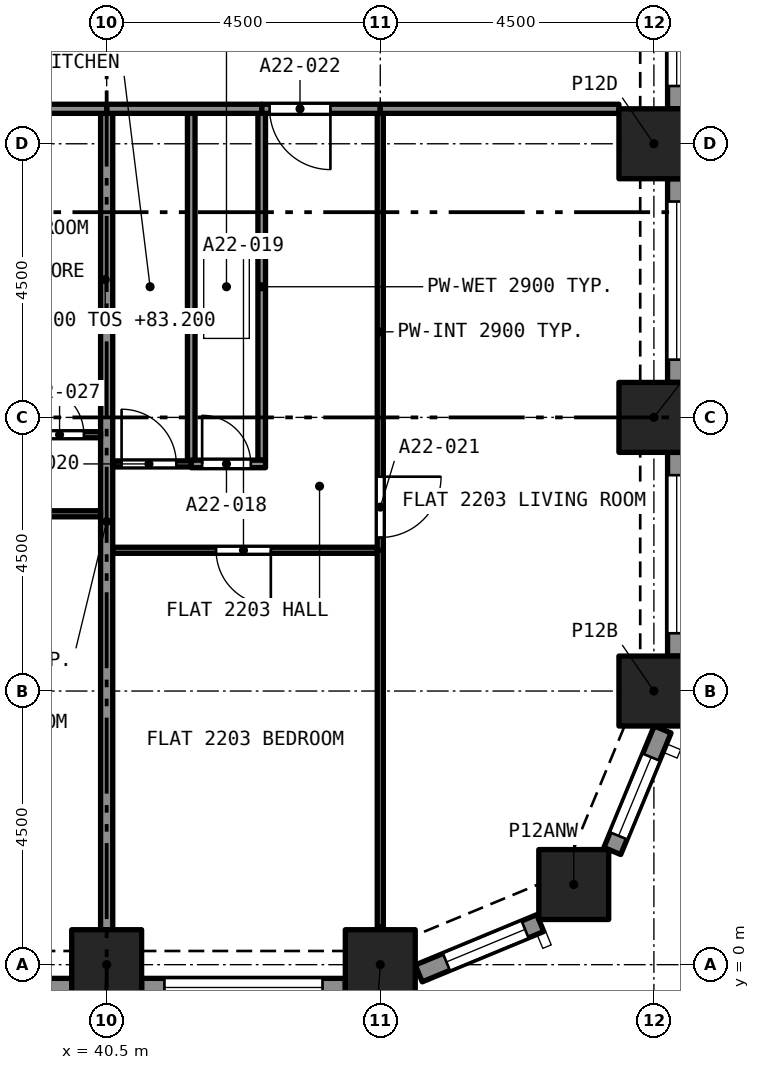
"""IFC4 building model, lengths in metres.
Left out: names, types, materials, properties, quantities, classifications, styles, units other than length and angle.
Written with IfcOpenShell. Run it as: python <this file> out.ifc"""

import sys

from ifc_helpers import new_model, si_unit, direction, frame, frame_2d, origin, origin_2d, place, context, subcontext, project, spatial, rectangle, extrude, element, fill, save


model = new_model("IFC4")
c1 = context("Model", 3, precision=1e-05, world=origin(), true_north=direction((0.0, 1.0)))
c2 = subcontext(c1, "Body", "Model", "MODEL_VIEW")
j1 = project(units=[si_unit("LENGTHUNIT", "METRE"), si_unit("PLANEANGLEUNIT", "RADIAN")], contexts=[c1])
p1 = place(None, origin())
s1 = spatial("IfcSite", under=j1, at=p1, CompositionType="ELEMENT")
p2 = place(p1, origin())
s2 = spatial("IfcBuilding", under=s1, at=p2, CompositionType="ELEMENT")
p3 = place(p2, frame((0.0, 0.0, 83.2)))
s3 = spatial("IfcBuildingStorey", under=s2, at=p3, CompositionType="ELEMENT", Elevation=83.2)
for number, where, z_axis, x_axis in (
    (1, (40.5, 0.0, 0.0), (0.0, 0.0, 1.0), (1.0, 0.0, 0.0)),
    (2, (45.0, 0.0, 0.0), (0.0, 0.0, 1.0), (1.0, 0.0, 0.0)),
    (3, (48.182, 1.318, 0.0), (0.0, 0.0, 1.0), (1.0, 0.0, 0.0)),
    (4, (49.5, 4.5, 0.0), (0.0, 0.0, 1.0), (1.0, 0.0, 0.0)),
    (5, (49.5, 9.0, 0.0), (0.0, 0.0, 1.0), (1.0, 0.0, 0.0)),
    (6, (49.5, 13.5, 0.0), (0.0, 0.0, 1.0), (1.0, 0.0, 0.0)),
):
    element("IfcColumn", number, at=place(p3, frame(where, z_axis=z_axis, x_axis=x_axis)), inside=s3, PredefinedType="COLUMN", context=c2, shape_type="SweptSolid", body=[
        extrude(rectangle(XDim=1.15, YDim=1.15, at=origin_2d()), origin(), (0.0, 0.0, 1.0), 3.2),
    ])
p4 = place(p3, frame((39.925, -0.375, 0.0), z_axis=(0.0, 0.0, 1.0), x_axis=(-1.0, 0.0, 0.0)))
e7 = element("IfcWall", 7, at=p4, inside=s3, PredefinedType="SOLIDWALL", context=c2, shape_type="SweptSolid", body=[
    extrude(rectangle(XDim=3.35, YDim=0.3, at=frame_2d((1.675, 0.0))), origin(), (0.0, 0.0, 1.0), 3.2),
])
p5 = place(p4, frame((0.375, 0.0, 0.45)))
e8 = element("IfcOpeningElement", 8, at=p5, cuts=e7, PredefinedType="OPENING", context=c2, shape_type="SweptSolid", body=[
    extrude(rectangle(XDim=2.6, YDim=1.95, at=frame_2d((1.3, 0.975))), frame((0.0, 0.16, 0.0), z_axis=(0.0, -1.0, 0.0), x_axis=(1.0, 0.0, 0.0)), (0.0, 0.0, 1.0), 0.32),
])
p6 = place(p3, frame((44.425, -0.375, 0.0), z_axis=(0.0, 0.0, 1.0), x_axis=(-1.0, 0.0, 0.0)))
e9 = element("IfcWall", 9, at=p6, inside=s3, PredefinedType="SOLIDWALL", context=c2, shape_type="SweptSolid", body=[
    extrude(rectangle(XDim=3.35, YDim=0.3, at=frame_2d((1.675, 0.0))), origin(), (0.0, 0.0, 1.0), 3.2),
])
p7 = place(p6, frame((0.375, 0.0, 0.45)))
e10 = element("IfcOpeningElement", 10, at=p7, cuts=e9, PredefinedType="OPENING", context=c2, shape_type="SweptSolid", body=[
    extrude(rectangle(XDim=2.6, YDim=1.95, at=frame_2d((1.3, 0.975))), frame((0.0, 0.16, 0.0), z_axis=(0.0, -1.0, 0.0), x_axis=(1.0, 0.0, 0.0)), (0.0, 0.0, 1.0), 0.32),
])
p8 = place(p3, frame((47.631, 0.684, 0.0), z_axis=(0.0, 0.0, 1.0), x_axis=(-0.923862802911, -0.382723818695, 0.0)))
e11 = element("IfcWall", 11, at=p8, inside=s3, PredefinedType="SOLIDWALL", context=c2, shape_type="SweptSolid", body=[
    extrude(rectangle(XDim=2.164, YDim=0.3, at=frame_2d((1.082, 0.0))), origin(), (0.0, 0.0, 1.0), 3.2),
])
p9 = place(p8, frame((0.271, 0.0, 0.45)))
e12 = element("IfcOpeningElement", 12, at=p9, cuts=e11, PredefinedType="OPENING", context=c2, shape_type="SweptSolid", body=[
    extrude(rectangle(XDim=1.4, YDim=1.95, at=frame_2d((0.7, 0.975))), frame((0.0, 0.16, 0.0), z_axis=(0.0, -1.0, 0.0), x_axis=(1.0, 0.0, 0.0)), (0.0, 0.0, 1.0), 0.32),
])
p10 = place(p3, frame((49.644, 3.868, 0.0), z_axis=(0.0, 0.0, 1.0), x_axis=(-0.382723818695, -0.923862802911, 0.0)))
e13 = element("IfcWall", 13, at=p10, inside=s3, PredefinedType="SOLIDWALL", context=c2, shape_type="SweptSolid", body=[
    extrude(rectangle(XDim=2.164, YDim=0.3, at=frame_2d((1.082, 0.0))), origin(), (0.0, 0.0, 1.0), 3.2),
])
p11 = place(p10, frame((0.493, 0.0, 0.45)))
e14 = element("IfcOpeningElement", 14, at=p11, cuts=e13, PredefinedType="OPENING", context=c2, shape_type="SweptSolid", body=[
    extrude(rectangle(XDim=1.4, YDim=1.95, at=frame_2d((0.7, 0.975))), frame((0.0, 0.16, 0.0), z_axis=(0.0, -1.0, 0.0), x_axis=(1.0, 0.0, 0.0)), (0.0, 0.0, 1.0), 0.32),
])
p12 = place(p3, frame((49.875, 8.425, 0.0), z_axis=(0.0, 0.0, 1.0), x_axis=(0.0, -1.0, 0.0)))
e15 = element("IfcWall", 15, at=p12, inside=s3, PredefinedType="SOLIDWALL", context=c2, shape_type="SweptSolid", body=[
    extrude(rectangle(XDim=3.35, YDim=0.3, at=frame_2d((1.675, 0.0))), origin(), (0.0, 0.0, 1.0), 3.2),
])
p13 = place(p12, frame((0.375, 0.0, 0.45)))
e16 = element("IfcOpeningElement", 16, at=p13, cuts=e15, PredefinedType="OPENING", context=c2, shape_type="SweptSolid", body=[
    extrude(rectangle(XDim=2.6, YDim=1.95, at=frame_2d((1.3, 0.975))), frame((0.0, 0.16, 0.0), z_axis=(0.0, -1.0, 0.0), x_axis=(1.0, 0.0, 0.0)), (0.0, 0.0, 1.0), 0.32),
])
p14 = place(p3, frame((49.875, 12.925, 0.0), z_axis=(0.0, 0.0, 1.0), x_axis=(0.0, -1.0, 0.0)))
e17 = element("IfcWall", 17, at=p14, inside=s3, PredefinedType="SOLIDWALL", context=c2, shape_type="SweptSolid", body=[
    extrude(rectangle(XDim=3.35, YDim=0.3, at=frame_2d((1.675, 0.0))), origin(), (0.0, 0.0, 1.0), 3.2),
])
p15 = place(p14, frame((0.375, 0.0, 0.45)))
e18 = element("IfcOpeningElement", 18, at=p15, cuts=e17, PredefinedType="OPENING", context=c2, shape_type="SweptSolid", body=[
    extrude(rectangle(XDim=2.6, YDim=1.95, at=frame_2d((1.3, 0.975))), frame((0.0, 0.16, 0.0), z_axis=(0.0, -1.0, 0.0), x_axis=(1.0, 0.0, 0.0)), (0.0, 0.0, 1.0), 0.32),
])
p16 = place(p3, frame((49.875, 17.425, 0.0), z_axis=(0.0, 0.0, 1.0), x_axis=(0.0, -1.0, 0.0)))
e19 = element("IfcWall", 19, at=p16, inside=s3, PredefinedType="SOLIDWALL", context=c2, shape_type="SweptSolid", body=[
    extrude(rectangle(XDim=3.35, YDim=0.3, at=frame_2d((1.675, 0.0))), origin(), (0.0, 0.0, 1.0), 3.2),
])
p17 = place(p16, frame((0.375, 0.0, 0.45)))
e20 = element("IfcOpeningElement", 20, at=p17, cuts=e19, PredefinedType="OPENING", context=c2, shape_type="SweptSolid", body=[
    extrude(rectangle(XDim=2.6, YDim=1.95, at=frame_2d((1.3, 0.975))), frame((0.0, 0.16, 0.0), z_axis=(0.0, -1.0, 0.0), x_axis=(1.0, 0.0, 0.0)), (0.0, 0.0, 1.0), 0.32),
])
p18 = place(p3, frame((43.05, 8.298, 0.0), z_axis=(0.0, 0.0, 1.0), x_axis=(0.0, 1.0, 0.0)))
e21 = element("IfcWall", 21, at=p18, inside=s3, PredefinedType="PARTITIONING", context=c2, shape_type="SweptSolid", body=[
    extrude(rectangle(XDim=5.702, YDim=0.125, at=frame_2d((2.851, 0.0))), origin(), (0.0, 0.0, 1.0), 2.9),
])
p19 = place(p3, frame((41.891, 8.235, 0.0), z_axis=(0.0, 0.0, 1.0), x_axis=(1.0, 0.0, 0.0)))
e22 = element("IfcWall", 22, at=p19, inside=s3, PredefinedType="PARTITIONING", context=c2, shape_type="SweptSolid", body=[
    extrude(rectangle(XDim=1.222, YDim=0.125, at=frame_2d((0.611, 0.0))), origin(), (0.0, 0.0, 1.0), 2.9),
])
p20 = place(p19, frame((0.179, 0.0, 0.0)))
e23 = element("IfcOpeningElement", 23, at=p20, cuts=e22, PredefinedType="OPENING", context=c2, shape_type="SweptSolid", body=[
    extrude(rectangle(XDim=0.8, YDim=2.1, at=frame_2d((0.4, 1.05))), frame((0.0, 0.073, 0.0), z_axis=(0.0, -1.0, 0.0), x_axis=(1.0, 0.0, 0.0)), (0.0, 0.0, 1.0), 0.145),
])
p21 = place(p3, frame((41.891, 8.298, 0.0), z_axis=(0.0, 0.0, 1.0), x_axis=(0.0, 1.0, 0.0)))
e24 = element("IfcWall", 24, at=p21, inside=s3, PredefinedType="PARTITIONING", context=c2, shape_type="SweptSolid", body=[
    extrude(rectangle(XDim=5.702, YDim=0.125, at=frame_2d((2.851, 0.0))), origin(), (0.0, 0.0, 1.0), 2.9),
])
p22 = place(p3, frame((44.95, 6.815, 0.0), z_axis=(0.0, 0.0, 1.0), x_axis=(-1.0, 0.0, 0.0)))
e25 = element("IfcWall", 25, at=p22, inside=s3, PredefinedType="PARTITIONING", context=c2, shape_type="SweptSolid", body=[
    extrude(rectangle(XDim=4.35, YDim=0.1, at=frame_2d((2.175, 0.0))), origin(), (0.0, 0.0, 1.0), 2.9),
])
p23 = place(p22, frame((1.75, 0.0, 0.0)))
e26 = element("IfcOpeningElement", 26, at=p23, cuts=e25, PredefinedType="OPENING", context=c2, shape_type="SweptSolid", body=[
    extrude(rectangle(XDim=0.9, YDim=2.1, at=frame_2d((0.45, 1.05))), frame((0.0, 0.06, 0.0), z_axis=(0.0, -1.0, 0.0), x_axis=(1.0, 0.0, 0.0)), (0.0, 0.0, 1.0), 0.12),
])
p24 = place(p3, frame((45.0, 0.622, 0.0), z_axis=(0.0, 0.0, 1.0), x_axis=(0.0, 1.0, 0.0)))
e27 = element("IfcWall", 27, at=p24, inside=s3, PredefinedType="PARTITIONING", context=c2, shape_type="SweptSolid", body=[
    extrude(rectangle(XDim=6.193, YDim=0.1, at=frame_2d((3.096, 0.0))), origin(), (0.0, 0.0, 1.0), 2.9),
])
p25 = place(p3, frame((40.5, 0.575, 0.0), z_axis=(0.0, 0.0, 1.0), x_axis=(0.0, 1.0, 0.0)))
e28 = element("IfcWall", 28, at=p25, inside=s3, PredefinedType="PARTITIONING", context=c2, shape_type="SweptSolid", body=[
    extrude(rectangle(XDim=13.425, YDim=0.2, at=frame_2d((6.712, 0.0))), origin(), (0.0, 0.0, 1.0), 2.9),
])
p26 = place(p3, frame((40.6, 8.235, 0.0), z_axis=(0.0, 0.0, 1.0), x_axis=(1.0, 0.0, 0.0)))
e29 = element("IfcWall", 29, at=p26, inside=s3, PredefinedType="PARTITIONING", context=c2, shape_type="SweptSolid", body=[
    extrude(rectangle(XDim=1.291, YDim=0.1, at=frame_2d((0.646, 0.0))), origin(), (0.0, 0.0, 1.0), 2.9),
])
p27 = place(p26, frame((0.146, 0.0, 0.0)))
e30 = element("IfcOpeningElement", 30, at=p27, cuts=e29, PredefinedType="OPENING", context=c2, shape_type="SweptSolid", body=[
    extrude(rectangle(XDim=0.9, YDim=2.1, at=frame_2d((0.45, 1.05))), frame((0.0, 0.06, 0.0), z_axis=(0.0, -1.0, 0.0), x_axis=(1.0, 0.0, 0.0)), (0.0, 0.0, 1.0), 0.12),
])
p28 = place(p3, frame((45.0, 14.0, 0.0), z_axis=(0.0, 0.0, 1.0), x_axis=(0.0, -1.0, 0.0)))
e31 = element("IfcWall", 31, at=p28, inside=s3, PredefinedType="PARTITIONING", context=c2, shape_type="SweptSolid", body=[
    extrude(rectangle(XDim=7.185, YDim=0.1, at=frame_2d((3.593, 0.0))), origin(), (0.0, 0.0, 1.0), 2.9),
])
p29 = place(p28, frame((5.975, 0.0, 0.0)))
e32 = element("IfcOpeningElement", 32, at=p29, cuts=e31, PredefinedType="OPENING", context=c2, shape_type="SweptSolid", body=[
    extrude(rectangle(XDim=1.0, YDim=2.1, at=frame_2d((0.5, 1.05))), frame((0.0, 0.06, 0.0), z_axis=(0.0, -1.0, 0.0), x_axis=(1.0, 0.0, 0.0)), (0.0, 0.0, 1.0), 0.12),
])
p30 = place(p3, frame((45.0, 14.075, 0.0), z_axis=(0.0, 0.0, 1.0), x_axis=(-1.0, 0.0, 0.0)))
e33 = element("IfcWall", 33, at=p30, inside=s3, PredefinedType="PARTITIONING", context=c2, shape_type="SweptSolid", body=[
    extrude(rectangle(XDim=1.95, YDim=0.15, at=frame_2d((0.975, 0.0))), origin(), (0.0, 0.0, 1.0), 2.9),
])
p31 = place(p30, frame((0.82, 0.0, 0.0)))
e34 = element("IfcOpeningElement", 34, at=p31, cuts=e33, PredefinedType="OPENING", context=c2, shape_type="SweptSolid", body=[
    extrude(rectangle(XDim=1.0, YDim=2.1, at=frame_2d((0.5, 1.05))), frame((0.0, 0.085, 0.0), z_axis=(0.0, -1.0, 0.0), x_axis=(1.0, 0.0, 0.0)), (0.0, 0.0, 1.0), 0.17),
])
p32 = place(p3, frame((40.5, 14.075, 0.0), z_axis=(0.0, 0.0, 1.0), x_axis=(1.0, 0.0, 0.0)))
e35 = element("IfcWall", 35, at=p32, inside=s3, PredefinedType="PARTITIONING", context=c2, shape_type="SweptSolid", body=[
    extrude(rectangle(XDim=2.55, YDim=0.15, at=frame_2d((1.275, 0.0))), origin(), (0.0, 0.0, 1.0), 2.9),
])
p33 = place(p3, frame((45.0, 14.075, 0.0), z_axis=(0.0, 0.0, 1.0), x_axis=(1.0, 0.0, 0.0)))
e36 = element("IfcWall", 36, at=p33, inside=s3, PredefinedType="PARTITIONING", context=c2, shape_type="SweptSolid", body=[
    extrude(rectangle(XDim=3.925, YDim=0.15, at=frame_2d((1.962, 0.0))), origin(), (0.0, 0.0, 1.0), 2.9),
])
p34 = place(p3, frame((36.6, 14.075, 0.0), z_axis=(0.0, 0.0, 1.0), x_axis=(1.0, 0.0, 0.0)))
e37 = element("IfcWall", 37, at=p34, inside=s3, PredefinedType="PARTITIONING", context=c2, shape_type="SweptSolid", body=[
    extrude(rectangle(XDim=3.9, YDim=0.15, at=frame_2d((1.95, 0.0))), origin(), (0.0, 0.0, 1.0), 2.9),
])
p35 = place(p3, frame((40.4, 7.415, 0.0), z_axis=(0.0, 0.0, 1.0), x_axis=(-1.0, 0.0, 0.0)))
e38 = element("IfcWall", 38, at=p35, inside=s3, PredefinedType="PARTITIONING", context=c2, shape_type="SweptSolid", body=[
    extrude(rectangle(XDim=4.4, YDim=0.1, at=frame_2d((2.2, 0.0))), origin(), (0.0, 0.0, 1.0), 2.9),
])
p36 = place(p35, frame((1.7, 0.0, 0.0)))
e39 = element("IfcOpeningElement", 39, at=p36, cuts=e38, PredefinedType="OPENING", context=c2, shape_type="SweptSolid", body=[
    extrude(rectangle(XDim=0.9, YDim=2.1, at=frame_2d((0.45, 1.05))), frame((0.0, 0.06, 0.0), z_axis=(0.0, -1.0, 0.0), x_axis=(1.0, 0.0, 0.0)), (0.0, 0.0, 1.0), 0.12),
])
p37 = place(p3, frame((38.951, 8.715, 0.0), z_axis=(0.0, 0.0, 1.0), x_axis=(1.0, 0.0, 0.0)))
e40 = element("IfcWall", 40, at=p37, inside=s3, PredefinedType="PARTITIONING", context=c2, shape_type="SweptSolid", body=[
    extrude(rectangle(XDim=1.449, YDim=0.1, at=frame_2d((0.724, 0.0))), origin(), (0.0, 0.0, 1.0), 2.9),
])
p38 = place(p37, frame((0.375, 0.0, 0.0)))
e41 = element("IfcOpeningElement", 41, at=p38, cuts=e40, PredefinedType="OPENING", context=c2, shape_type="SweptSolid", body=[
    extrude(rectangle(XDim=0.8, YDim=2.1, at=frame_2d((0.4, 1.05))), frame((0.0, 0.06, 0.0), z_axis=(0.0, -1.0, 0.0), x_axis=(1.0, 0.0, 0.0)), (0.0, 0.0, 1.0), 0.12),
])
p39 = place(p7, origin())
e42 = element("IfcWindow", 42, at=p39, inside=s3, PartitioningType="SINGLE_PANEL", PredefinedType="WINDOW", context=c2, shape_type="SweptSolid", body=[
    extrude(rectangle(XDim=2.6, YDim=1.95, at=frame_2d((1.3, 0.975))), frame((0.0, 0.03, 0.0), z_axis=(0.0, -1.0, 0.0), x_axis=(1.0, 0.0, 0.0)), (0.0, 0.0, 1.0), 0.06),
])
fill(e10, e42)
p40 = place(p9, origin())
e43 = element("IfcWindow", 43, at=p40, inside=s3, PartitioningType="SINGLE_PANEL", PredefinedType="WINDOW", context=c2, shape_type="SweptSolid", body=[
    extrude(rectangle(XDim=1.4, YDim=1.95, at=frame_2d((0.7, 0.975))), frame((0.0, 0.03, 0.0), z_axis=(0.0, -1.0, 0.0), x_axis=(1.0, 0.0, 0.0)), (0.0, 0.0, 1.0), 0.06),
])
fill(e12, e43)
p41 = place(p11, origin())
e44 = element("IfcWindow", 44, at=p41, inside=s3, PartitioningType="SINGLE_PANEL", PredefinedType="WINDOW", context=c2, shape_type="SweptSolid", body=[
    extrude(rectangle(XDim=1.4, YDim=1.95, at=frame_2d((0.7, 0.975))), frame((0.0, 0.03, 0.0), z_axis=(0.0, -1.0, 0.0), x_axis=(1.0, 0.0, 0.0)), (0.0, 0.0, 1.0), 0.06),
])
fill(e14, e44)
p42 = place(p13, origin())
e45 = element("IfcWindow", 45, at=p42, inside=s3, PartitioningType="SINGLE_PANEL", PredefinedType="WINDOW", context=c2, shape_type="SweptSolid", body=[
    extrude(rectangle(XDim=2.6, YDim=1.95, at=frame_2d((1.3, 0.975))), frame((0.0, 0.03, 0.0), z_axis=(0.0, -1.0, 0.0), x_axis=(1.0, 0.0, 0.0)), (0.0, 0.0, 1.0), 0.06),
])
fill(e16, e45)
p43 = place(p15, origin())
e46 = element("IfcWindow", 46, at=p43, inside=s3, PartitioningType="SINGLE_PANEL", PredefinedType="WINDOW", context=c2, shape_type="SweptSolid", body=[
    extrude(rectangle(XDim=2.6, YDim=1.95, at=frame_2d((1.3, 0.975))), frame((0.0, 0.03, 0.0), z_axis=(0.0, -1.0, 0.0), x_axis=(1.0, 0.0, 0.0)), (0.0, 0.0, 1.0), 0.06),
])
fill(e18, e46)
p44 = place(p17, origin())
e47 = element("IfcWindow", 47, at=p44, inside=s3, PartitioningType="SINGLE_PANEL", PredefinedType="WINDOW", context=c2, shape_type="SweptSolid", body=[
    extrude(rectangle(XDim=2.6, YDim=1.95, at=frame_2d((1.3, 0.975))), frame((0.0, 0.03, 0.0), z_axis=(0.0, -1.0, 0.0), x_axis=(1.0, 0.0, 0.0)), (0.0, 0.0, 1.0), 0.06),
])
fill(e20, e47)
p45 = place(p20, origin())
e48 = element("IfcDoor", 48, at=p45, inside=s3, OperationType="SINGLE_SWING_LEFT", PredefinedType="DOOR", context=c2, shape_type="SweptSolid", body=[
    extrude(rectangle(XDim=0.8, YDim=2.1, at=frame_2d((0.4, 1.05))), frame((0.0, 0.025, 0.0), z_axis=(0.0, -1.0, 0.0), x_axis=(1.0, 0.0, 0.0)), (0.0, 0.0, 1.0), 0.05),
])
fill(e23, e48)
p46 = place(p23, origin())
e49 = element("IfcDoor", 49, at=p46, inside=s3, OperationType="SINGLE_SWING_RIGHT", PredefinedType="DOOR", context=c2, shape_type="SweptSolid", body=[
    extrude(rectangle(XDim=0.9, YDim=2.1, at=frame_2d((0.45, 1.05))), frame((0.0, 0.025, 0.0), z_axis=(0.0, -1.0, 0.0), x_axis=(1.0, 0.0, 0.0)), (0.0, 0.0, 1.0), 0.05),
])
fill(e26, e49)
p47 = place(p27, origin())
e50 = element("IfcDoor", 50, at=p47, inside=s3, OperationType="SINGLE_SWING_LEFT", PredefinedType="DOOR", context=c2, shape_type="SweptSolid", body=[
    extrude(rectangle(XDim=0.9, YDim=2.1, at=frame_2d((0.45, 1.05))), frame((0.0, 0.025, 0.0), z_axis=(0.0, -1.0, 0.0), x_axis=(1.0, 0.0, 0.0)), (0.0, 0.0, 1.0), 0.05),
])
fill(e30, e50)
p48 = place(p29, origin())
e51 = element("IfcDoor", 51, at=p48, inside=s3, OperationType="SINGLE_SWING_RIGHT", PredefinedType="DOOR", context=c2, shape_type="SweptSolid", body=[
    extrude(rectangle(XDim=1.0, YDim=2.1, at=frame_2d((0.5, 1.05))), frame((0.0, 0.025, 0.0), z_axis=(0.0, -1.0, 0.0), x_axis=(1.0, 0.0, 0.0)), (0.0, 0.0, 1.0), 0.05),
])
fill(e32, e51)
p49 = place(p31, origin())
e52 = element("IfcDoor", 52, at=p49, inside=s3, OperationType="SINGLE_SWING_RIGHT", PredefinedType="DOOR", context=c2, shape_type="SweptSolid", body=[
    extrude(rectangle(XDim=1.0, YDim=2.1, at=frame_2d((0.5, 1.05))), frame((0.0, 0.025, 0.0), z_axis=(0.0, -1.0, 0.0), x_axis=(1.0, 0.0, 0.0)), (0.0, 0.0, 1.0), 0.05),
])
fill(e34, e52)
p50 = place(p38, origin())
e53 = element("IfcDoor", 53, at=p50, inside=s3, OperationType="SINGLE_SWING_RIGHT", PredefinedType="DOOR", context=c2, shape_type="SweptSolid", body=[
    extrude(rectangle(XDim=0.8, YDim=2.1, at=frame_2d((0.4, 1.05))), frame((0.0, 0.025, 0.0), z_axis=(0.0, -1.0, 0.0), x_axis=(1.0, 0.0, 0.0)), (0.0, 0.0, 1.0), 0.05),
])
fill(e41, e53)
save(model, sys.argv[1])
